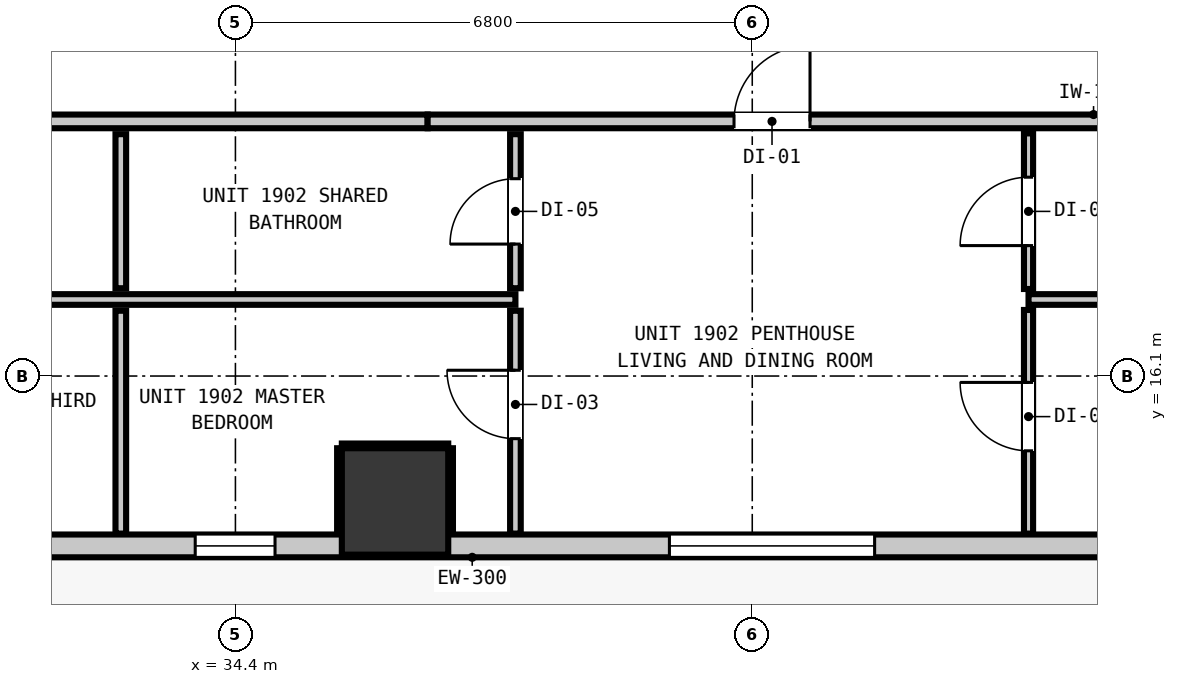
"""IFC4 building model, lengths in metres.
Left out: names, types, materials, properties, quantities, classifications, styles, units other than length and angle.
Written with IfcOpenShell. Run it as: python <this file> out.ifc"""

import sys

from ifc_helpers import new_model, si_unit, direction, frame, frame_2d, origin, origin_2d, place, context, subcontext, project, spatial, rectangle, extrude, element, fill, save


model = new_model("IFC4")
c1 = context("Model", 3, precision=1e-05, world=origin(), true_north=direction((0.0, 1.0)))
c2 = subcontext(c1, "Body", "Model", "MODEL_VIEW")
j1 = project(units=[si_unit("LENGTHUNIT", "METRE"), si_unit("PLANEANGLEUNIT", "RADIAN")], contexts=[c1])
p1 = place(None, origin())
s1 = spatial("IfcSite", under=j1, at=p1, CompositionType="ELEMENT")
p2 = place(p1, origin())
s2 = spatial("IfcBuilding", under=s1, at=p2, CompositionType="ELEMENT")
p3 = place(p2, frame((0.0, 0.0, 68.48)))
s3 = spatial("IfcBuildingStorey", under=s2, at=p3, CompositionType="ELEMENT", Elevation=68.48)
p4 = place(p3, frame((36.5, 14.45, 0.0), z_axis=(0.0, 0.0, 1.0), x_axis=(1.0, 0.0, 0.0)))
e1 = element("IfcColumn", 1, at=p4, inside=s3, PredefinedType="COLUMN", context=c2, shape_type="SweptSolid", body=[
    extrude(rectangle(XDim=1.4, YDim=1.4, at=origin_2d()), origin(), (0.0, 0.0, 1.0), 3.32),
])
p5 = place(p3, frame((47.835, 13.865, 0.0), z_axis=(0.0, 0.0, 1.0), x_axis=(-1.0, 0.0, 0.0)))
e2 = element("IfcWall", 2, at=p5, inside=s3, PredefinedType="STANDARD", context=c2, shape_type="SweptSolid", body=[
    extrude(rectangle(XDim=37.47, YDim=0.3, at=frame_2d((18.735, 0.0))), origin(), (0.0, 0.0, 1.0), 3.06),
])
p6 = place(p5, frame((0.901, 0.0, 0.0)))
e3 = element("IfcOpeningElement", 3, at=p6, cuts=e2, PredefinedType="OPENING", context=c2, shape_type="SweptSolid", body=[
    extrude(rectangle(XDim=1.0, YDim=2.15, at=frame_2d((0.5, 1.075))), frame((0.0, 0.16, 0.0), z_axis=(0.0, -1.0, 0.0), x_axis=(1.0, 0.0, 0.0)), (0.0, 0.0, 1.0), 0.32),
])
p7 = place(p5, frame((28.895, 0.0, 0.85)))
e4 = element("IfcOpeningElement", 4, at=p7, cuts=e2, PredefinedType="OPENING", context=c2, shape_type="SweptSolid", body=[
    extrude(rectangle(XDim=2.7, YDim=2.0, at=frame_2d((1.35, 1.0))), frame((0.0, 0.16, 0.0), z_axis=(0.0, -1.0, 0.0), x_axis=(1.0, 0.0, 0.0)), (0.0, 0.0, 1.0), 0.32),
])
p8 = place(p5, frame((35.733, 0.0, 0.85)))
e5 = element("IfcOpeningElement", 5, at=p8, cuts=e2, PredefinedType="OPENING", context=c2, shape_type="SweptSolid", body=[
    extrude(rectangle(XDim=1.05, YDim=1.65, at=frame_2d((0.525, 0.825))), frame((0.0, 0.16, 0.0), z_axis=(0.0, -1.0, 0.0), x_axis=(1.0, 0.0, 0.0)), (0.0, 0.0, 1.0), 0.32),
])
p9 = place(p5, frame((21.451, 0.0, 0.85)))
e6 = element("IfcOpeningElement", 6, at=p9, cuts=e2, PredefinedType="OPENING", context=c2, shape_type="SweptSolid", body=[
    extrude(rectangle(XDim=2.7, YDim=2.0, at=frame_2d((1.35, 1.0))), frame((0.0, 0.16, 0.0), z_axis=(0.0, -1.0, 0.0), x_axis=(1.0, 0.0, 0.0)), (0.0, 0.0, 1.0), 0.32),
])
p10 = place(p5, frame((15.964, 0.0, 0.85)))
e7 = element("IfcOpeningElement", 7, at=p10, cuts=e2, PredefinedType="OPENING", context=c2, shape_type="SweptSolid", body=[
    extrude(rectangle(XDim=1.05, YDim=1.65, at=frame_2d((0.525, 0.825))), frame((0.0, 0.16, 0.0), z_axis=(0.0, -1.0, 0.0), x_axis=(1.0, 0.0, 0.0)), (0.0, 0.0, 1.0), 0.32),
])
p11 = place(p5, frame((5.025, 0.0, 0.85)))
e8 = element("IfcOpeningElement", 8, at=p11, cuts=e2, PredefinedType="OPENING", context=c2, shape_type="SweptSolid", body=[
    extrude(rectangle(XDim=2.7, YDim=2.0, at=frame_2d((1.35, 1.0))), frame((0.0, 0.16, 0.0), z_axis=(0.0, -1.0, 0.0), x_axis=(1.0, 0.0, 0.0)), (0.0, 0.0, 1.0), 0.32),
])
p12 = place(p5, frame((12.914, 0.0, 0.85)))
e9 = element("IfcOpeningElement", 9, at=p12, cuts=e2, PredefinedType="OPENING", context=c2, shape_type="SweptSolid", body=[
    extrude(rectangle(XDim=1.05, YDim=1.65, at=frame_2d((0.525, 0.825))), frame((0.0, 0.16, 0.0), z_axis=(0.0, -1.0, 0.0), x_axis=(1.0, 0.0, 0.0)), (0.0, 0.0, 1.0), 0.32),
])
p13 = place(p3, frame((8.027, 19.45, 0.0), z_axis=(0.0, 0.0, 1.0), x_axis=(1.0, 0.0, 0.0)))
e10 = element("IfcWall", 10, at=p13, inside=s3, PredefinedType="PARTITIONING", context=c2, shape_type="SweptSolid", body=[
    extrude(rectangle(XDim=28.902, YDim=0.18, at=frame_2d((14.451, 0.0))), origin(), (0.0, 0.0, 1.0), 3.06),
])
p14 = place(p13, frame((10.187, 0.0, 0.0)))
e11 = element("IfcOpeningElement", 11, at=p14, cuts=e10, PredefinedType="OPENING", context=c2, shape_type="SweptSolid", body=[
    extrude(rectangle(XDim=1.0, YDim=2.15, at=frame_2d((0.5, 1.075))), frame((0.0, 0.1, 0.0), z_axis=(0.0, -1.0, 0.0), x_axis=(1.0, 0.0, 0.0)), (0.0, 0.0, 1.0), 0.2),
])
p15 = place(p3, frame((36.929, 19.45, 0.0), z_axis=(0.0, 0.0, 1.0), x_axis=(1.0, 0.0, 0.0)))
e12 = element("IfcWall", 12, at=p15, inside=s3, PredefinedType="PARTITIONING", context=c2, shape_type="SweptSolid", body=[
    extrude(rectangle(XDim=12.392, YDim=0.18, at=frame_2d((6.196, 0.0))), origin(), (0.0, 0.0, 1.0), 2.445),
])
p16 = place(p15, frame((4.031, 0.0, 0.0)))
e13 = element("IfcOpeningElement", 13, at=p16, cuts=e12, PredefinedType="OPENING", context=c2, shape_type="SweptSolid", body=[
    extrude(rectangle(XDim=1.0, YDim=2.15, at=frame_2d((0.5, 1.075))), frame((0.0, 0.1, 0.0), z_axis=(0.0, -1.0, 0.0), x_axis=(1.0, 0.0, 0.0)), (0.0, 0.0, 1.0), 0.2),
])
p17 = place(p3, frame((22.448, 17.107, 0.0), z_axis=(0.0, 0.0, 1.0), x_axis=(1.0, 0.0, 0.0)))
e14 = element("IfcWall", 14, at=p17, inside=s3, PredefinedType="PARTITIONING", context=c2, shape_type="SweptSolid", body=[
    extrude(rectangle(XDim=15.636, YDim=0.14, at=frame_2d((7.818, 0.0))), origin(), (0.0, 0.0, 1.0), 3.06),
])
p18 = place(p3, frame((44.835, 17.107, 0.0), z_axis=(0.0, 0.0, 1.0), x_axis=(1.0, 0.0, 0.0)))
e15 = element("IfcWall", 15, at=p18, inside=s3, PredefinedType="PARTITIONING", context=c2, shape_type="SweptSolid", body=[
    extrude(rectangle(XDim=5.338, YDim=0.14, at=frame_2d((2.669, 0.0))), origin(), (0.0, 0.0, 1.0), 3.06),
])
p19 = place(p3, frame((32.892, 14.027, 0.0), z_axis=(0.0, 0.0, 1.0), x_axis=(0.0, 1.0, 0.0)))
e16 = element("IfcWall", 16, at=p19, inside=s3, PredefinedType="PARTITIONING", context=c2, shape_type="SweptSolid", body=[
    extrude(rectangle(XDim=2.932, YDim=0.14, at=frame_2d((1.466, 0.0))), origin(), (0.0, 0.0, 1.0), 3.06),
])
p20 = place(p3, frame((32.892, 17.255, 0.0), z_axis=(0.0, 0.0, 1.0), x_axis=(0.0, 1.0, 0.0)))
e17 = element("IfcWall", 17, at=p20, inside=s3, PredefinedType="PARTITIONING", context=c2, shape_type="SweptSolid", body=[
    extrude(rectangle(XDim=2.027, YDim=0.14, at=frame_2d((1.014, 0.0))), origin(), (0.0, 0.0, 1.0), 3.06),
])
p21 = place(p3, frame((38.084, 14.027, 0.0), z_axis=(0.0, 0.0, 1.0), x_axis=(0.0, 1.0, 0.0)))
e18 = element("IfcWall", 18, at=p21, inside=s3, PredefinedType="PARTITIONING", context=c2, shape_type="SweptSolid", body=[
    extrude(rectangle(XDim=2.932, YDim=0.14, at=frame_2d((1.466, 0.0))), origin(), (0.0, 0.0, 1.0), 3.06),
])
p22 = place(p21, frame((1.249, 0.0, 0.0)))
e19 = element("IfcOpeningElement", 19, at=p22, cuts=e18, PredefinedType="OPENING", context=c2, shape_type="SweptSolid", body=[
    extrude(rectangle(XDim=0.9, YDim=2.1, at=frame_2d((0.45, 1.05))), frame((0.0, 0.08, 0.0), z_axis=(0.0, -1.0, 0.0), x_axis=(1.0, 0.0, 0.0)), (0.0, 0.0, 1.0), 0.16),
])
p23 = place(p3, frame((38.084, 17.255, 0.0), z_axis=(0.0, 0.0, 1.0), x_axis=(0.0, 1.0, 0.0)))
e20 = element("IfcWall", 20, at=p23, inside=s3, PredefinedType="PARTITIONING", context=c2, shape_type="SweptSolid", body=[
    extrude(rectangle(XDim=2.027, YDim=0.14, at=frame_2d((1.014, 0.0))), origin(), (0.0, 0.0, 1.0), 3.06),
])
p24 = place(p23, frame((0.581, 0.0, 0.0)))
e21 = element("IfcOpeningElement", 21, at=p24, cuts=e20, PredefinedType="OPENING", context=c2, shape_type="SweptSolid", body=[
    extrude(rectangle(XDim=0.86, YDim=2.02, at=frame_2d((0.43, 1.01))), frame((0.0, 0.08, 0.0), z_axis=(0.0, -1.0, 0.0), x_axis=(1.0, 0.0, 0.0)), (0.0, 0.0, 1.0), 0.16),
])
p25 = place(p3, frame((44.835, 14.027, 0.0), z_axis=(0.0, 0.0, 1.0), x_axis=(0.0, 1.0, 0.0)))
e22 = element("IfcWall", 22, at=p25, inside=s3, PredefinedType="PARTITIONING", context=c2, shape_type="SweptSolid", body=[
    extrude(rectangle(XDim=2.942, YDim=0.12, at=frame_2d((1.471, 0.0))), origin(), (0.0, 0.0, 1.0), 3.06),
])
p26 = place(p25, frame((1.089, 0.0, 0.0)))
e23 = element("IfcOpeningElement", 23, at=p26, cuts=e22, PredefinedType="OPENING", context=c2, shape_type="SweptSolid", body=[
    extrude(rectangle(XDim=0.9, YDim=2.1, at=frame_2d((0.45, 1.05))), frame((0.0, 0.07, 0.0), z_axis=(0.0, -1.0, 0.0), x_axis=(1.0, 0.0, 0.0)), (0.0, 0.0, 1.0), 0.14),
])
p27 = place(p3, frame((44.835, 17.245, 0.0), z_axis=(0.0, 0.0, 1.0), x_axis=(0.0, 1.0, 0.0)))
e24 = element("IfcWall", 24, at=p27, inside=s3, PredefinedType="PARTITIONING", context=c2, shape_type="SweptSolid", body=[
    extrude(rectangle(XDim=2.047, YDim=0.12, at=frame_2d((1.023, 0.0))), origin(), (0.0, 0.0, 1.0), 3.06),
])
p28 = place(p27, frame((0.571, 0.0, 0.0)))
e25 = element("IfcOpeningElement", 25, at=p28, cuts=e24, PredefinedType="OPENING", context=c2, shape_type="SweptSolid", body=[
    extrude(rectangle(XDim=0.9, YDim=2.1, at=frame_2d((0.45, 1.05))), frame((0.0, 0.07, 0.0), z_axis=(0.0, -1.0, 0.0), x_axis=(1.0, 0.0, 0.0)), (0.0, 0.0, 1.0), 0.14),
])
p29 = place(p3, frame((35.8, 15.182, 0.0), z_axis=(0.0, 0.0, 1.0), x_axis=(1.0, 0.0, 0.0)))
e26 = element("IfcWall", 26, at=p29, inside=s3, PredefinedType="PARTITIONING", context=c2, shape_type="SweptSolid", body=[
    extrude(rectangle(XDim=1.4, YDim=0.06, at=frame_2d((0.7, 0.0))), origin(), (0.0, 0.0, 1.0), 1.45),
])
for number, where, z_axis, x_axis in (
    (27, (35.768, 14.03, 0.0), (0.0, 0.0, 1.0), (0.0, 1.0, 0.0)),
    (28, (37.232, 14.03, 0.0), (0.0, 0.0, 1.0), (0.0, 1.0, 0.0)),
):
    element("IfcWall", number, at=place(p3, frame(where, z_axis=z_axis, x_axis=x_axis)), inside=s3, PredefinedType="PARTITIONING", context=c2, shape_type="SweptSolid", body=[
        extrude(rectangle(XDim=1.12, YDim=0.06, at=frame_2d((0.56, 0.0))), origin(), (0.0, 0.0, 1.0), 1.45),
    ])
p30 = place(p11, origin())
e29 = element("IfcWindow", 29, at=p30, inside=s3, PartitioningType="SINGLE_PANEL", PredefinedType="WINDOW", context=c2, shape_type="SweptSolid", body=[
    extrude(rectangle(XDim=2.7, YDim=2.0, at=frame_2d((1.35, 1.0))), frame((0.0, 0.03, 0.0), z_axis=(0.0, -1.0, 0.0), x_axis=(1.0, 0.0, 0.0)), (0.0, 0.0, 1.0), 0.06),
])
fill(e8, e29)
p31 = place(p12, origin())
e30 = element("IfcWindow", 30, at=p31, inside=s3, PartitioningType="SINGLE_PANEL", PredefinedType="WINDOW", context=c2, shape_type="SweptSolid", body=[
    extrude(rectangle(XDim=1.05, YDim=1.65, at=frame_2d((0.525, 0.825))), frame((0.0, 0.03, 0.0), z_axis=(0.0, -1.0, 0.0), x_axis=(1.0, 0.0, 0.0)), (0.0, 0.0, 1.0), 0.06),
])
fill(e9, e30)
p32 = place(p16, origin())
e31 = element("IfcDoor", 31, at=p32, inside=s3, OperationType="SINGLE_SWING_RIGHT", PredefinedType="DOOR", context=c2, shape_type="SweptSolid", body=[
    extrude(rectangle(XDim=1.0, YDim=2.15, at=frame_2d((0.5, 1.075))), frame((0.0, 0.025, 0.0), z_axis=(0.0, -1.0, 0.0), x_axis=(1.0, 0.0, 0.0)), (0.0, 0.0, 1.0), 0.05),
])
fill(e13, e31)
p33 = place(p24, origin())
e32 = element("IfcDoor", 32, at=p33, inside=s3, OperationType="SINGLE_SWING_LEFT", PredefinedType="DOOR", context=c2, shape_type="SweptSolid", body=[
    extrude(rectangle(XDim=0.86, YDim=2.02, at=frame_2d((0.43, 1.01))), frame((0.0, 0.025, 0.0), z_axis=(0.0, -1.0, 0.0), x_axis=(1.0, 0.0, 0.0)), (0.0, 0.0, 1.0), 0.05),
])
fill(e21, e32)
p34 = place(p22, origin())
e33 = element("IfcDoor", 33, at=p34, inside=s3, OperationType="SINGLE_SWING_RIGHT", PredefinedType="DOOR", context=c2, shape_type="SweptSolid", body=[
    extrude(rectangle(XDim=0.9, YDim=2.1, at=frame_2d((0.45, 1.05))), frame((0.0, 0.025, 0.0), z_axis=(0.0, -1.0, 0.0), x_axis=(1.0, 0.0, 0.0)), (0.0, 0.0, 1.0), 0.05),
])
fill(e19, e33)
p35 = place(p28, origin())
e34 = element("IfcDoor", 34, at=p35, inside=s3, OperationType="SINGLE_SWING_LEFT", PredefinedType="DOOR", context=c2, shape_type="SweptSolid", body=[
    extrude(rectangle(XDim=0.9, YDim=2.1, at=frame_2d((0.45, 1.05))), frame((0.0, 0.025, 0.0), z_axis=(0.0, -1.0, 0.0), x_axis=(1.0, 0.0, 0.0)), (0.0, 0.0, 1.0), 0.05),
])
fill(e25, e34)
p36 = place(p26, origin())
e35 = element("IfcDoor", 35, at=p36, inside=s3, OperationType="SINGLE_SWING_RIGHT", PredefinedType="DOOR", context=c2, shape_type="SweptSolid", body=[
    extrude(rectangle(XDim=0.9, YDim=2.1, at=frame_2d((0.45, 1.05))), frame((0.0, 0.025, 0.0), z_axis=(0.0, -1.0, 0.0), x_axis=(1.0, 0.0, 0.0)), (0.0, 0.0, 1.0), 0.05),
])
fill(e23, e35)
save(model, sys.argv[1])
